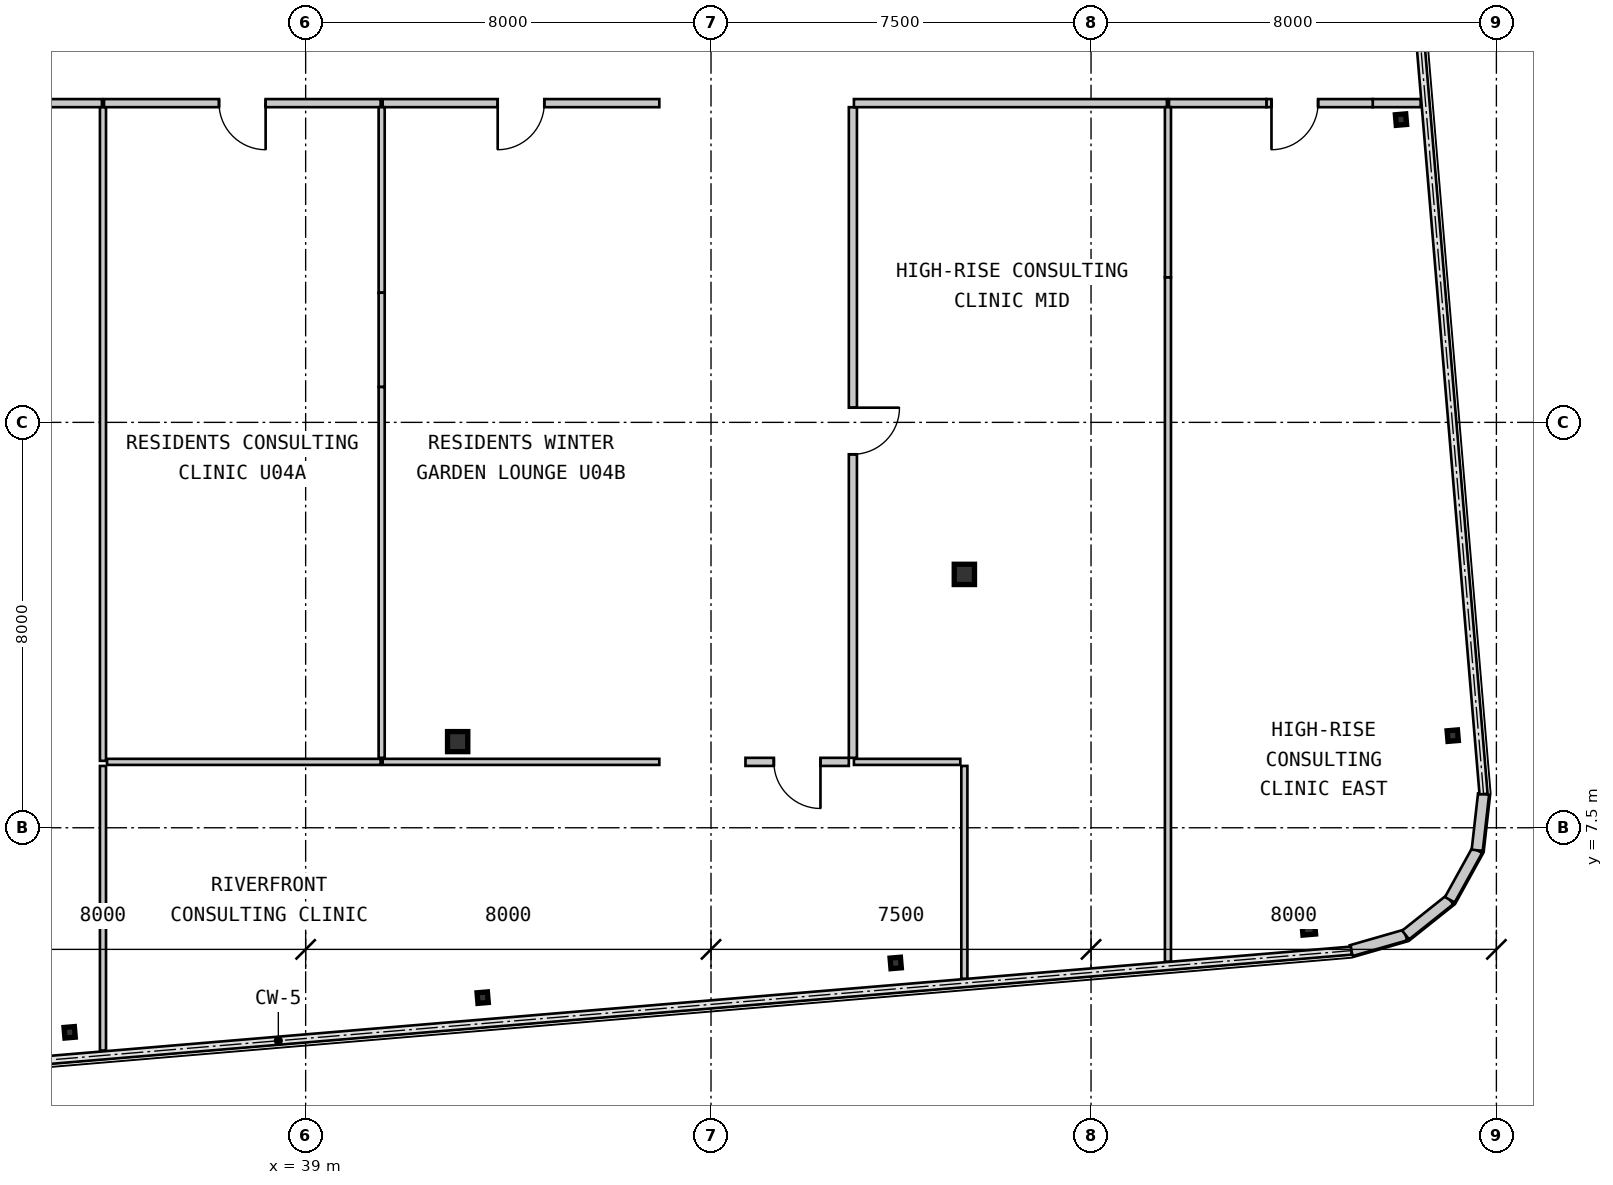
"""IFC4 building model, lengths in metres.
Left out: names, types, materials, properties, quantities, classifications, styles, units other than length and angle.
Written with IfcOpenShell. Run it as: python <this file> out.ifc"""

import sys

from ifc_helpers import new_model, si_unit, direction, frame, frame_2d, origin, origin_2d, place, context, subcontext, project, spatial, rectangle, hollow_rectangle, i_section, extrude, source, transform, mapped, element, fill, save


model = new_model("IFC4")
c1 = context("Model", 3, precision=1e-05, world=origin(), true_north=direction((0.0, 1.0)))
c2 = subcontext(c1, "Body", "Model", "MODEL_VIEW")
j1 = project(units=[si_unit("LENGTHUNIT", "METRE"), si_unit("PLANEANGLEUNIT", "RADIAN")], contexts=[c1])
p1 = place(None, origin())
s1 = spatial("IfcSite", under=j1, at=p1, CompositionType="ELEMENT")
p2 = place(p1, origin())
s2 = spatial("IfcBuilding", under=s1, at=p2, CompositionType="ELEMENT")
p3 = place(p2, frame((0.0, 0.0, 191.45)))
s3 = spatial("IfcBuildingStorey", under=s2, at=p3, CompositionType="ELEMENT", Elevation=191.45)
m1 = source(origin(), c2, "Body", "SweptSolid", [
    extrude(i_section(OverallWidth=0.4, OverallDepth=0.396, WebThickness=0.022, FlangeThickness=0.034, at=origin_2d()), origin(), (0.0, 0.0, 1.0), 3.15),
])
p4 = place(p3, frame((42.0, 9.2, 0.0), z_axis=(0.0, 0.0, 1.0), x_axis=(1.0, 0.0, 0.0)))
e1 = element("IfcColumn", 1, at=p4, inside=s3, PredefinedType="COLUMN", context=c2, shape_type="MappedRepresentation", body=[
    mapped(m1, transform((0.0, 0.0, 0.0), scale=1.0)),
])
m2 = source(origin(), c2, "Body", "SweptSolid", [
    extrude(hollow_rectangle(XDim=0.4, YDim=0.4, WallThickness=0.016, at=origin_2d()), origin(), (0.0, 0.0, 1.0), 3.15),
])
p5 = place(p3, frame((52.0, 12.5, 0.0), z_axis=(0.0, 0.0, 1.0), x_axis=(1.0, 0.0, 0.0)))
e2 = element("IfcColumn", 2, at=p5, inside=s3, PredefinedType="COLUMN", context=c2, shape_type="MappedRepresentation", body=[
    mapped(m2, transform((0.0, 0.0, 0.0), scale=1.0)),
])
m3 = source(origin(), c2, "Body", "SweptSolid", [
    extrude(i_section(OverallWidth=0.205, OverallDepth=0.21, WebThickness=0.009, FlangeThickness=0.014, at=origin_2d()), origin(), (0.0, 0.0, 1.0), 3.15),
])
for number, where, z_axis, x_axis in (
    (3, (34.342, 3.463, 0.0), (0.0, 0.0, 1.0), (0.996, 0.084, 0.0)),
    (4, (42.494, 4.147, 0.0), (0.0, 0.0, 1.0), (0.996, 0.084, 0.0)),
    (5, (50.645, 4.832, 0.0), (0.0, 0.0, 1.0), (0.996, 0.084, 0.0)),
):
    element("IfcColumn", number, at=place(p3, frame(where, z_axis=z_axis, x_axis=x_axis)), inside=s3, PredefinedType="COLUMN", context=c2, shape_type="MappedRepresentation", body=[
        mapped(m3, transform((0.0, 0.0, 0.0), scale=1.0)),
    ])
m4 = source(origin(), c2, "Body", "SweptSolid", [
    extrude(hollow_rectangle(XDim=0.25, YDim=0.25, WallThickness=0.01, at=origin_2d()), origin(), (0.0, 0.0, 1.0), 3.15),
])
p6 = place(p3, frame((58.796, 5.516, 0.0), z_axis=(0.0, 0.0, 1.0), x_axis=(0.99649285925, 0.083677843332, 0.0)))
e6 = element("IfcColumn", 6, at=p6, inside=s3, PredefinedType="COLUMN", context=c2, shape_type="MappedRepresentation", body=[
    mapped(m4, transform((0.0, 0.0, 0.0), scale=1.0)),
])
for number, where, z_axis, x_axis in (
    (7, (61.638, 9.318, 0.0), (0.0, 0.0, 1.0), (0.996, 0.084, 0.0)),
    (8, (60.617, 21.475, 0.0), (0.0, 0.0, 1.0), (0.996, 0.084, 0.0)),
):
    element("IfcColumn", number, at=place(p3, frame(where, z_axis=z_axis, x_axis=x_axis)), inside=s3, PredefinedType="COLUMN", context=c2, shape_type="MappedRepresentation", body=[
        mapped(m3, transform((0.0, 0.0, 0.0), scale=1.0)),
    ])
m5 = source(origin(), c2, "Body", "SweptSolid", [
    extrude(rectangle(XDim=1.116, YDim=0.22, at=frame_2d((0.558, 0.0))), origin(), (0.0, 0.0, 1.0), 2.93),
])
for number, where, z_axis, x_axis in (
    (9, (59.636, 5.075, 0.0), (0.0, 0.0, 1.0), (0.961, 0.277, 0.0)),
    (10, (60.708, 5.384, 0.0), (0.0, 0.0, 1.0), (0.782, 0.623, 0.0)),
    (11, (61.581, 6.079, 0.0), (0.0, 0.0, 1.0), (0.484, 0.875, 0.0)),
    (12, (62.121, 7.056, 0.0), (0.0, 0.0, 1.0), (0.112, 0.994, 0.0)),
):
    element("IfcWall", number, at=place(p3, frame(where, z_axis=z_axis, x_axis=x_axis)), inside=s3, PredefinedType="SOLIDWALL", context=c2, shape_type="MappedRepresentation", body=[
        mapped(m5, transform((0.0, 0.0, 0.0), scale=1.0)),
    ])
m6 = source(origin(), c2, "Body", "SweptSolid", [
    extrude(rectangle(XDim=2.04, YDim=0.16, at=frame_2d((1.02, 0.0))), origin(), (0.0, 0.0, 1.0), 2.93),
])
p7 = place(p3, frame((49.72, 8.8, 0.0), z_axis=(0.0, 0.0, 1.0), x_axis=(-1.0, 0.0, 0.0)))
e13 = element("IfcWall", 13, at=p7, inside=s3, PredefinedType="PARTITIONING", context=c2, shape_type="MappedRepresentation", body=[
    mapped(m6, transform((0.0, 0.0, 0.0), scale=1.0)),
])
m7 = source(origin(), c2, "Body", "SweptSolid", [
    extrude(rectangle(XDim=0.92, YDim=2.1, at=frame_2d((0.46, 1.05))), frame((0.0, 0.09, 0.0), z_axis=(0.0, -1.0, 0.0), x_axis=(1.0, 0.0, 0.0)), (0.0, 0.0, 1.0), 0.18),
])
p8 = place(p7, frame((0.56, 0.0, 0.0)))
e14 = element("IfcOpeningElement", 14, at=p8, cuts=e13, PredefinedType="OPENING", context=c2, shape_type="MappedRepresentation", body=[
    mapped(m7, transform((0.0, 0.0, 0.0), scale=1.0)),
])
m8 = source(origin(), c2, "Body", "SweptSolid", [
    extrude(rectangle(XDim=4.209, YDim=0.16, at=frame_2d((2.105, 0.0))), origin(), (0.0, 0.0, 1.0), 2.93),
])
p9 = place(p3, frame((34.98, 21.8, 0.0), z_axis=(0.0, 0.0, 1.0), x_axis=(-1.0, 0.0, 0.0)))
e15 = element("IfcWall", 15, at=p9, inside=s3, PredefinedType="PARTITIONING", context=c2, shape_type="MappedRepresentation", body=[
    mapped(m8, transform((0.0, 0.0, 0.0), scale=1.0)),
])
p10 = place(p9, frame((1.645, 0.0, 0.0)))
e16 = element("IfcOpeningElement", 16, at=p10, cuts=e15, PredefinedType="OPENING", context=c2, shape_type="MappedRepresentation", body=[
    mapped(m7, transform((0.0, 0.0, 0.0), scale=1.0)),
])
m9 = source(origin(), c2, "Body", "SweptSolid", [
    extrude(rectangle(XDim=5.459, YDim=0.16, at=frame_2d((2.73, 0.0))), origin(), (0.0, 0.0, 1.0), 2.93),
])
p11 = place(p3, frame((40.48, 21.8, 0.0), z_axis=(0.0, 0.0, 1.0), x_axis=(-1.0, 0.0, 0.0)))
e17 = element("IfcWall", 17, at=p11, inside=s3, PredefinedType="PARTITIONING", context=c2, shape_type="MappedRepresentation", body=[
    mapped(m9, transform((0.0, 0.0, 0.0), scale=1.0)),
])
p12 = place(p11, frame((2.27, 0.0, 0.0)))
e18 = element("IfcOpeningElement", 18, at=p12, cuts=e17, PredefinedType="OPENING", context=c2, shape_type="MappedRepresentation", body=[
    mapped(m7, transform((0.0, 0.0, 0.0), scale=1.0)),
])
p13 = place(p3, frame((45.98, 21.8, 0.0), z_axis=(0.0, 0.0, 1.0), x_axis=(-1.0, 0.0, 0.0)))
e19 = element("IfcWall", 19, at=p13, inside=s3, PredefinedType="PARTITIONING", context=c2, shape_type="MappedRepresentation", body=[
    mapped(m9, transform((0.0, 0.0, 0.0), scale=1.0)),
])
p14 = place(p13, frame((2.27, 0.0, 0.0)))
e20 = element("IfcOpeningElement", 20, at=p14, cuts=e19, PredefinedType="OPENING", context=c2, shape_type="MappedRepresentation", body=[
    mapped(m7, transform((0.0, 0.0, 0.0), scale=1.0)),
])
m10 = source(origin(), c2, "Body", "SweptSolid", [
    extrude(rectangle(XDim=12.84, YDim=0.16, at=frame_2d((6.42, 0.0))), origin(), (0.0, 0.0, 1.0), 2.93),
])
p15 = place(p3, frame((49.8, 21.72, 0.0), z_axis=(0.0, 0.0, 1.0), x_axis=(0.0, -1.0, 0.0)))
e21 = element("IfcWall", 21, at=p15, inside=s3, PredefinedType="PARTITIONING", context=c2, shape_type="MappedRepresentation", body=[
    mapped(m10, transform((0.0, 0.0, 0.0), scale=1.0)),
])
p16 = place(p15, frame((5.93, 0.0, 0.0)))
e22 = element("IfcOpeningElement", 22, at=p16, cuts=e21, PredefinedType="OPENING", context=c2, shape_type="MappedRepresentation", body=[
    mapped(m7, transform((0.0, 0.0, 0.0), scale=1.0)),
])
m11 = source(origin(), c2, "Body", "SweptSolid", [
    extrude(rectangle(XDim=6.177, YDim=0.16, at=frame_2d((3.088, 0.0))), origin(), (0.0, 0.0, 1.0), 2.93),
])
p17 = place(p3, frame((55.997, 21.8, 0.0), z_axis=(0.0, 0.0, 1.0), x_axis=(-1.0, 0.0, 0.0)))
e23 = element("IfcWall", 23, at=p17, inside=s3, PredefinedType="PARTITIONING", context=c2, shape_type="MappedRepresentation", body=[
    mapped(m11, transform((0.0, 0.0, 0.0), scale=1.0)),
])
m12 = source(origin(), c2, "Body", "SweptSolid", [
    extrude(rectangle(XDim=0.945, YDim=0.16, at=frame_2d((0.473, 0.0))), origin(), (0.0, 0.0, 1.0), 2.93),
])
p18 = place(p3, frame((61.005, 21.8, 0.0), z_axis=(0.0, 0.0, 1.0), x_axis=(-1.0, 0.0, 0.0)))
e24 = element("IfcWall", 24, at=p18, inside=s3, PredefinedType="PARTITIONING", context=c2, shape_type="MappedRepresentation", body=[
    mapped(m12, transform((0.0, 0.0, 0.0), scale=1.0)),
])
m13 = source(origin(), c2, "Body", "SweptSolid", [
    extrude(rectangle(XDim=2.098, YDim=0.16, at=frame_2d((1.049, 0.0))), origin(), (0.0, 0.0, 1.0), 2.47),
])
p19 = place(p3, frame((60.059, 21.8, 0.0), z_axis=(0.0, 0.0, 1.0), x_axis=(-1.0, 0.0, 0.0)))
e25 = element("IfcWall", 25, at=p19, inside=s3, PredefinedType="PARTITIONING", context=c2, shape_type="MappedRepresentation", body=[
    mapped(m13, transform((0.0, 0.0, 0.0), scale=1.0)),
])
p20 = place(p19, frame((1.078, 0.0, 0.0)))
e26 = element("IfcOpeningElement", 26, at=p20, cuts=e25, PredefinedType="OPENING", context=c2, shape_type="MappedRepresentation", body=[
    mapped(m7, transform((0.0, 0.0, 0.0), scale=1.0)),
])
m14 = source(origin(), c2, "Body", "SweptSolid", [
    extrude(rectangle(XDim=1.924, YDim=0.16, at=frame_2d((0.962, 0.0))), origin(), (0.0, 0.0, 1.0), 2.93),
])
p21 = place(p3, frame((57.961, 21.8, 0.0), z_axis=(0.0, 0.0, 1.0), x_axis=(-1.0, 0.0, 0.0)))
e27 = element("IfcWall", 27, at=p21, inside=s3, PredefinedType="PARTITIONING", context=c2, shape_type="MappedRepresentation", body=[
    mapped(m14, transform((0.0, 0.0, 0.0), scale=1.0)),
])
m15 = source(origin(), c2, "Body", "SweptSolid", [
    extrude(rectangle(XDim=5.616, YDim=0.12, at=frame_2d((2.808, 0.0))), origin(), (0.0, 0.0, 1.0), 2.93),
])
p22 = place(p3, frame((35.0, 3.104, 0.0), z_axis=(0.0, 0.0, 1.0), x_axis=(0.0, 1.0, 0.0)))
e28 = element("IfcWall", 28, at=p22, inside=s3, PredefinedType="PARTITIONING", context=c2, shape_type="MappedRepresentation", body=[
    mapped(m15, transform((0.0, 0.0, 0.0), scale=1.0)),
])
m16 = source(origin(), c2, "Body", "SweptSolid", [
    extrude(rectangle(XDim=5.4, YDim=0.12, at=frame_2d((2.7, 0.0))), origin(), (0.0, 0.0, 1.0), 2.93),
])
p23 = place(p3, frame((35.08, 8.8, 0.0), z_axis=(0.0, 0.0, 1.0), x_axis=(1.0, 0.0, 0.0)))
e29 = element("IfcWall", 29, at=p23, inside=s3, PredefinedType="PARTITIONING", context=c2, shape_type="MappedRepresentation", body=[
    mapped(m16, transform((0.0, 0.0, 0.0), scale=1.0)),
])
m17 = source(origin(), c2, "Body", "SweptSolid", [
    extrude(rectangle(XDim=5.459, YDim=0.12, at=frame_2d((2.73, 0.0))), origin(), (0.0, 0.0, 1.0), 2.93),
])
p24 = place(p3, frame((40.52, 8.8, 0.0), z_axis=(0.0, 0.0, 1.0), x_axis=(1.0, 0.0, 0.0)))
e30 = element("IfcWall", 30, at=p24, inside=s3, PredefinedType="PARTITIONING", context=c2, shape_type="MappedRepresentation", body=[
    mapped(m17, transform((0.0, 0.0, 0.0), scale=1.0)),
])
m18 = source(origin(), c2, "Body", "SweptSolid", [
    extrude(rectangle(XDim=4.202, YDim=0.12, at=frame_2d((2.101, 0.0))), origin(), (0.0, 0.0, 1.0), 2.93),
])
p25 = place(p3, frame((52.0, 8.72, 0.0), z_axis=(0.0, 0.0, 1.0), x_axis=(0.0, -1.0, 0.0)))
e31 = element("IfcWall", 31, at=p25, inside=s3, PredefinedType="PARTITIONING", context=c2, shape_type="MappedRepresentation", body=[
    mapped(m18, transform((0.0, 0.0, 0.0), scale=1.0)),
])
m19 = source(origin(), c2, "Body", "SweptSolid", [
    extrude(rectangle(XDim=2.1, YDim=0.12, at=frame_2d((1.05, 0.0))), origin(), (0.0, 0.0, 1.0), 2.93),
])
p26 = place(p3, frame((49.82, 8.8, 0.0), z_axis=(0.0, 0.0, 1.0), x_axis=(1.0, 0.0, 0.0)))
e32 = element("IfcWall", 32, at=p26, inside=s3, PredefinedType="PARTITIONING", context=c2, shape_type="MappedRepresentation", body=[
    mapped(m19, transform((0.0, 0.0, 0.0), scale=1.0)),
])
m20 = source(origin(), c2, "Body", "SweptSolid", [
    extrude(rectangle(XDim=12.898, YDim=0.12, at=frame_2d((6.449, 0.0))), origin(), (0.0, 0.0, 1.0), 2.93),
])
p27 = place(p3, frame((35.0, 21.718, 0.0), z_axis=(0.0, 0.0, 1.0), x_axis=(0.0, -1.0, 0.0)))
e33 = element("IfcWall", 33, at=p27, inside=s3, PredefinedType="PARTITIONING", context=c2, shape_type="MappedRepresentation", body=[
    mapped(m20, transform((0.0, 0.0, 0.0), scale=1.0)),
])
m21 = source(origin(), c2, "Body", "SweptSolid", [
    extrude(rectangle(XDim=3.661, YDim=0.12, at=frame_2d((1.831, 0.0))), origin(), (0.0, 0.0, 1.0), 2.93),
])
p28 = place(p3, frame((40.5, 21.72, 0.0), z_axis=(0.0, 0.0, 1.0), x_axis=(0.0, -1.0, 0.0)))
e34 = element("IfcWall", 34, at=p28, inside=s3, PredefinedType="PARTITIONING", context=c2, shape_type="MappedRepresentation", body=[
    mapped(m21, transform((0.0, 0.0, 0.0), scale=1.0)),
])
m22 = source(origin(), c2, "Body", "SweptSolid", [
    extrude(rectangle(XDim=1.861, YDim=0.12, at=frame_2d((0.93, 0.0))), origin(), (0.0, 0.0, 1.0), 2.328),
])
p29 = place(p3, frame((40.5, 18.059, 0.0), z_axis=(0.0, 0.0, 1.0), x_axis=(0.0, -1.0, 0.0)))
e35 = element("IfcWall", 35, at=p29, inside=s3, PredefinedType="PARTITIONING", context=c2, shape_type="MappedRepresentation", body=[
    mapped(m22, transform((0.0, 0.0, 0.0), scale=1.0)),
])
m23 = source(origin(), c2, "Body", "SweptSolid", [
    extrude(rectangle(XDim=7.318, YDim=0.12, at=frame_2d((3.659, 0.0))), origin(), (0.0, 0.0, 1.0), 2.93),
])
p30 = place(p3, frame((40.5, 16.198, 0.0), z_axis=(0.0, 0.0, 1.0), x_axis=(0.0, -1.0, 0.0)))
e36 = element("IfcWall", 36, at=p30, inside=s3, PredefinedType="PARTITIONING", context=c2, shape_type="MappedRepresentation", body=[
    mapped(m23, transform((0.0, 0.0, 0.0), scale=1.0)),
])
m24 = source(origin(), c2, "Body", "SweptSolid", [
    extrude(rectangle(XDim=3.359, YDim=0.12, at=frame_2d((1.68, 0.0))), origin(), (0.0, 0.0, 1.0), 2.397),
])
p31 = place(p3, frame((56.018, 21.72, 0.0), z_axis=(0.0, 0.0, 1.0), x_axis=(0.0, -1.0, 0.0)))
e37 = element("IfcWall", 37, at=p31, inside=s3, PredefinedType="PARTITIONING", context=c2, shape_type="MappedRepresentation", body=[
    mapped(m24, transform((0.0, 0.0, 0.0), scale=1.0)),
])
m25 = source(origin(), c2, "Body", "SweptSolid", [
    extrude(rectangle(XDim=13.506, YDim=0.12, at=frame_2d((6.753, 0.0))), origin(), (0.0, 0.0, 1.0), 2.93),
])
p32 = place(p3, frame((56.018, 18.361, 0.0), z_axis=(0.0, 0.0, 1.0), x_axis=(0.0, -1.0, 0.0)))
e38 = element("IfcWall", 38, at=p32, inside=s3, PredefinedType="PARTITIONING", context=c2, shape_type="MappedRepresentation", body=[
    mapped(m25, transform((0.0, 0.0, 0.0), scale=1.0)),
])
m26 = source(origin(), c2, "Body", "SweptSolid", [
    extrude(rectangle(XDim=0.92, YDim=2.1, at=frame_2d((0.46, 1.05))), frame((0.0, 0.025, 0.0), z_axis=(0.0, -1.0, 0.0), x_axis=(1.0, 0.0, 0.0)), (0.0, 0.0, 1.0), 0.05),
])
p33 = place(p8, origin())
e39 = element("IfcDoor", 39, at=p33, inside=s3, OperationType="SINGLE_SWING_LEFT", PredefinedType="DOOR", context=c2, shape_type="MappedRepresentation", body=[
    mapped(m26, transform((0.0, 0.0, 0.0), scale=1.0)),
])
fill(e14, e39)
p34 = place(p12, origin())
e40 = element("IfcDoor", 40, at=p34, inside=s3, OperationType="SINGLE_SWING_LEFT", PredefinedType="DOOR", context=c2, shape_type="MappedRepresentation", body=[
    mapped(m26, transform((0.0, 0.0, 0.0), scale=1.0)),
])
fill(e18, e40)
p35 = place(p14, origin())
e41 = element("IfcDoor", 41, at=p35, inside=s3, OperationType="SINGLE_SWING_RIGHT", PredefinedType="DOOR", context=c2, shape_type="MappedRepresentation", body=[
    mapped(m26, transform((0.0, 0.0, 0.0), scale=1.0)),
])
fill(e20, e41)
p36 = place(p16, origin())
e42 = element("IfcDoor", 42, at=p36, inside=s3, OperationType="SINGLE_SWING_LEFT", PredefinedType="DOOR", context=c2, shape_type="MappedRepresentation", body=[
    mapped(m26, transform((0.0, 0.0, 0.0), scale=1.0)),
])
fill(e22, e42)
p37 = place(p20, origin())
e43 = element("IfcDoor", 43, at=p37, inside=s3, OperationType="SINGLE_SWING_RIGHT", PredefinedType="DOOR", context=c2, shape_type="MappedRepresentation", body=[
    mapped(m26, transform((0.0, 0.0, 0.0), scale=1.0)),
])
fill(e26, e43)
save(model, sys.argv[1])
